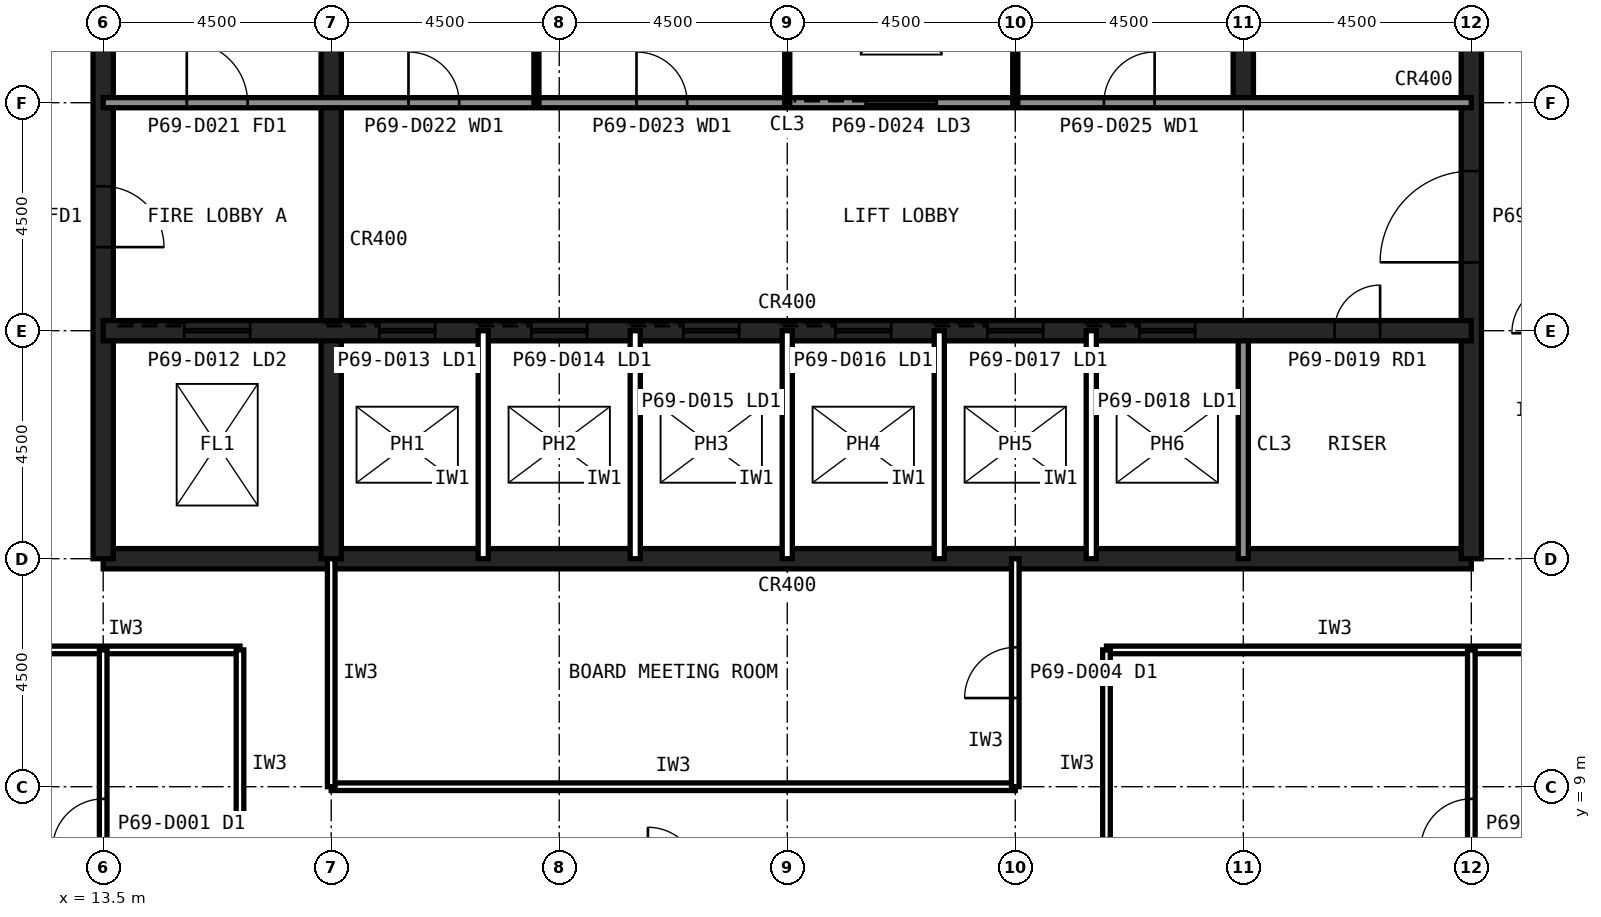
"""IFC4 building model, lengths in metres.
Left out: names, types, materials, properties, quantities, classifications, styles, units other than length and angle.
Written with IfcOpenShell. Run it as: python <this file> out.ifc"""

import sys

from ifc_helpers import new_model, si_unit, direction, frame, frame_2d, origin, place, context, subcontext, project, spatial, rectangle, extrude, element, fill, save


model = new_model("IFC4")
c1 = context("Model", 3, precision=1e-05, world=origin(), true_north=direction((0.0, 1.0)))
c2 = subcontext(c1, "Body", "Model", "MODEL_VIEW")
j1 = project(units=[si_unit("LENGTHUNIT", "METRE"), si_unit("PLANEANGLEUNIT", "RADIAN")], contexts=[c1])
p1 = place(None, origin())
s1 = spatial("IfcSite", under=j1, at=p1, CompositionType="ELEMENT")
p2 = place(p1, origin())
s2 = spatial("IfcBuilding", under=s1, at=p2, CompositionType="ELEMENT")
p3 = place(p2, frame((0.0, 0.0, 286.6)))
s3 = spatial("IfcBuildingStorey", under=s2, at=p3, CompositionType="ELEMENT", Elevation=286.6)
p4 = place(p3, frame((13.5, 13.5, 0.0), z_axis=(0.0, 0.0, 1.0), x_axis=(1.0, 0.0, 0.0)))
e1 = element("IfcWall", 1, at=p4, inside=s3, PredefinedType="SHEAR", context=c2, shape_type="SweptSolid", body=[
    extrude(rectangle(XDim=27.0, YDim=0.4, at=frame_2d((13.5, 0.0))), origin(), (0.0, 0.0, 1.0), 4.0),
])
p5 = place(p3, frame((40.5, 13.5, 0.0), z_axis=(0.0, 0.0, 1.0), x_axis=(0.0, 1.0, 0.0)))
e2 = element("IfcWall", 2, at=p5, inside=s3, PredefinedType="SHEAR", context=c2, shape_type="SweptSolid", body=[
    extrude(rectangle(XDim=27.0, YDim=0.4, at=frame_2d((13.5, 0.0))), origin(), (0.0, 0.0, 1.0), 4.0),
])
p6 = place(p5, frame((5.85, 0.0, 0.0)))
e3 = element("IfcOpeningElement", 3, at=p6, cuts=e2, PredefinedType="OPENING", context=c2, shape_type="SweptSolid", body=[
    extrude(rectangle(XDim=1.8, YDim=2.1, at=frame_2d((0.9, 1.05))), frame((0.0, 0.21, 0.0), z_axis=(0.0, -1.0, 0.0), x_axis=(1.0, 0.0, 0.0)), (0.0, 0.0, 1.0), 0.42),
])
p7 = place(p5, frame((19.65, 0.0, 0.0)))
e4 = element("IfcOpeningElement", 4, at=p7, cuts=e2, PredefinedType="OPENING", context=c2, shape_type="SweptSolid", body=[
    extrude(rectangle(XDim=1.2, YDim=2.1, at=frame_2d((0.6, 1.05))), frame((0.0, 0.21, 0.0), z_axis=(0.0, -1.0, 0.0), x_axis=(1.0, 0.0, 0.0)), (0.0, 0.0, 1.0), 0.42),
])
p8 = place(p3, frame((13.5, 40.5, 0.0), z_axis=(0.0, 0.0, 1.0), x_axis=(0.0, -1.0, 0.0)))
e5 = element("IfcWall", 5, at=p8, inside=s3, PredefinedType="SHEAR", context=c2, shape_type="SweptSolid", body=[
    extrude(rectangle(XDim=27.0, YDim=0.4, at=frame_2d((13.5, 0.0))), origin(), (0.0, 0.0, 1.0), 4.0),
])
p9 = place(p8, frame((19.65, 0.0, 0.0)))
e6 = element("IfcOpeningElement", 6, at=p9, cuts=e5, PredefinedType="OPENING", context=c2, shape_type="SweptSolid", body=[
    extrude(rectangle(XDim=1.2, YDim=2.1, at=frame_2d((0.6, 1.05))), frame((0.0, 0.21, 0.0), z_axis=(0.0, -1.0, 0.0), x_axis=(1.0, 0.0, 0.0)), (0.0, 0.0, 1.0), 0.42),
])
p10 = place(p8, frame((5.85, 0.0, 0.0)))
e7 = element("IfcOpeningElement", 7, at=p10, cuts=e5, PredefinedType="OPENING", context=c2, shape_type="SweptSolid", body=[
    extrude(rectangle(XDim=1.8, YDim=2.1, at=frame_2d((0.9, 1.05))), frame((0.0, 0.21, 0.0), z_axis=(0.0, -1.0, 0.0), x_axis=(1.0, 0.0, 0.0)), (0.0, 0.0, 1.0), 0.42),
])
p11 = place(p3, frame((18.0, 13.5, 0.0), z_axis=(0.0, 0.0, 1.0), x_axis=(0.0, 1.0, 0.0)))
e8 = element("IfcWall", 8, at=p11, inside=s3, PredefinedType="SHEAR", context=c2, shape_type="SweptSolid", body=[
    extrude(rectangle(XDim=18.0, YDim=0.4, at=frame_2d((9.0, 0.0))), origin(), (0.0, 0.0, 1.0), 4.0),
])
p12 = place(p3, frame((36.0, 13.5, 0.0), z_axis=(0.0, 0.0, 1.0), x_axis=(0.0, 1.0, 0.0)))
e9 = element("IfcWall", 9, at=p12, inside=s3, PredefinedType="SOLIDWALL", context=c2, shape_type="SweptSolid", body=[
    extrude(rectangle(XDim=4.5, YDim=0.2, at=frame_2d((2.25, 0.0))), origin(), (0.0, 0.0, 1.0), 3.84),
])
p13 = place(p3, frame((36.0, 22.5, 0.0), z_axis=(0.0, 0.0, 1.0), x_axis=(0.0, 1.0, 0.0)))
e10 = element("IfcWall", 10, at=p13, inside=s3, PredefinedType="SHEAR", context=c2, shape_type="SweptSolid", body=[
    extrude(rectangle(XDim=18.0, YDim=0.4, at=frame_2d((9.0, 0.0))), origin(), (0.0, 0.0, 1.0), 4.0),
])
p14 = place(p3, frame((13.5, 18.0, 0.0), z_axis=(0.0, 0.0, 1.0), x_axis=(1.0, 0.0, 0.0)))
e11 = element("IfcWall", 11, at=p14, inside=s3, PredefinedType="SHEAR", context=c2, shape_type="SweptSolid", body=[
    extrude(rectangle(XDim=27.0, YDim=0.4, at=frame_2d((13.5, 0.0))), origin(), (0.0, 0.0, 1.0), 4.0),
])
p15 = place(p14, frame((24.3, 0.0, 0.0)))
e12 = element("IfcOpeningElement", 12, at=p15, cuts=e11, PredefinedType="OPENING", context=c2, shape_type="SweptSolid", body=[
    extrude(rectangle(XDim=0.9, YDim=2.1, at=frame_2d((0.45, 1.05))), frame((0.0, 0.21, 0.0), z_axis=(0.0, -1.0, 0.0), x_axis=(1.0, 0.0, 0.0)), (0.0, 0.0, 1.0), 0.42),
])
p16 = place(p14, frame((5.45, 0.0, 0.0)))
e13 = element("IfcOpeningElement", 13, at=p16, cuts=e11, PredefinedType="OPENING", context=c2, shape_type="SweptSolid", body=[
    extrude(rectangle(XDim=1.1, YDim=2.1, at=frame_2d((0.55, 1.05))), frame((0.0, 0.21, 0.0), z_axis=(0.0, -1.0, 0.0), x_axis=(1.0, 0.0, 0.0)), (0.0, 0.0, 1.0), 0.42),
])
p17 = place(p14, frame((8.45, 0.0, 0.0)))
e14 = element("IfcOpeningElement", 14, at=p17, cuts=e11, PredefinedType="OPENING", context=c2, shape_type="SweptSolid", body=[
    extrude(rectangle(XDim=1.1, YDim=2.1, at=frame_2d((0.55, 1.05))), frame((0.0, 0.21, 0.0), z_axis=(0.0, -1.0, 0.0), x_axis=(1.0, 0.0, 0.0)), (0.0, 0.0, 1.0), 0.42),
])
p18 = place(p14, frame((11.45, 0.0, 0.0)))
e15 = element("IfcOpeningElement", 15, at=p18, cuts=e11, PredefinedType="OPENING", context=c2, shape_type="SweptSolid", body=[
    extrude(rectangle(XDim=1.1, YDim=2.1, at=frame_2d((0.55, 1.05))), frame((0.0, 0.21, 0.0), z_axis=(0.0, -1.0, 0.0), x_axis=(1.0, 0.0, 0.0)), (0.0, 0.0, 1.0), 0.42),
])
p19 = place(p14, frame((14.45, 0.0, 0.0)))
e16 = element("IfcOpeningElement", 16, at=p19, cuts=e11, PredefinedType="OPENING", context=c2, shape_type="SweptSolid", body=[
    extrude(rectangle(XDim=1.1, YDim=2.1, at=frame_2d((0.55, 1.05))), frame((0.0, 0.21, 0.0), z_axis=(0.0, -1.0, 0.0), x_axis=(1.0, 0.0, 0.0)), (0.0, 0.0, 1.0), 0.42),
])
p20 = place(p14, frame((17.45, 0.0, 0.0)))
e17 = element("IfcOpeningElement", 17, at=p20, cuts=e11, PredefinedType="OPENING", context=c2, shape_type="SweptSolid", body=[
    extrude(rectangle(XDim=1.1, YDim=2.1, at=frame_2d((0.55, 1.05))), frame((0.0, 0.21, 0.0), z_axis=(0.0, -1.0, 0.0), x_axis=(1.0, 0.0, 0.0)), (0.0, 0.0, 1.0), 0.42),
])
p21 = place(p14, frame((20.45, 0.0, 0.0)))
e18 = element("IfcOpeningElement", 18, at=p21, cuts=e11, PredefinedType="OPENING", context=c2, shape_type="SweptSolid", body=[
    extrude(rectangle(XDim=1.1, YDim=2.1, at=frame_2d((0.55, 1.05))), frame((0.0, 0.21, 0.0), z_axis=(0.0, -1.0, 0.0), x_axis=(1.0, 0.0, 0.0)), (0.0, 0.0, 1.0), 0.42),
])
p22 = place(p14, frame((1.6, 0.0, 0.0)))
e19 = element("IfcOpeningElement", 19, at=p22, cuts=e11, PredefinedType="OPENING", context=c2, shape_type="SweptSolid", body=[
    extrude(rectangle(XDim=1.3, YDim=2.2, at=frame_2d((0.65, 1.1))), frame((0.0, 0.21, 0.0), z_axis=(0.0, -1.0, 0.0), x_axis=(1.0, 0.0, 0.0)), (0.0, 0.0, 1.0), 0.42),
])
p23 = place(p3, frame((13.5, 22.5, 0.0), z_axis=(0.0, 0.0, 1.0), x_axis=(1.0, 0.0, 0.0)))
e20 = element("IfcWall", 20, at=p23, inside=s3, PredefinedType="SOLIDWALL", context=c2, shape_type="SweptSolid", body=[
    extrude(rectangle(XDim=27.0, YDim=0.2, at=frame_2d((13.5, 0.0))), origin(), (0.0, 0.0, 1.0), 3.84),
])
p24 = place(p23, frame((1.65, 0.0, 0.0)))
e21 = element("IfcOpeningElement", 21, at=p24, cuts=e20, PredefinedType="OPENING", context=c2, shape_type="SweptSolid", body=[
    extrude(rectangle(XDim=1.2, YDim=2.1, at=frame_2d((0.6, 1.05))), frame((0.0, 0.11, 0.0), z_axis=(0.0, -1.0, 0.0), x_axis=(1.0, 0.0, 0.0)), (0.0, 0.0, 1.0), 0.22),
])
p25 = place(p23, frame((6.025, 0.0, 0.0)))
e22 = element("IfcOpeningElement", 22, at=p25, cuts=e20, PredefinedType="OPENING", context=c2, shape_type="SweptSolid", body=[
    extrude(rectangle(XDim=1.0, YDim=2.1, at=frame_2d((0.5, 1.05))), frame((0.0, 0.11, 0.0), z_axis=(0.0, -1.0, 0.0), x_axis=(1.0, 0.0, 0.0)), (0.0, 0.0, 1.0), 0.22),
])
p26 = place(p23, frame((10.525, 0.0, 0.0)))
e23 = element("IfcOpeningElement", 23, at=p26, cuts=e20, PredefinedType="OPENING", context=c2, shape_type="SweptSolid", body=[
    extrude(rectangle(XDim=1.0, YDim=2.1, at=frame_2d((0.5, 1.05))), frame((0.0, 0.11, 0.0), z_axis=(0.0, -1.0, 0.0), x_axis=(1.0, 0.0, 0.0)), (0.0, 0.0, 1.0), 0.22),
])
p27 = place(p23, frame((19.75, 0.0, 0.0)))
e24 = element("IfcOpeningElement", 24, at=p27, cuts=e20, PredefinedType="OPENING", context=c2, shape_type="SweptSolid", body=[
    extrude(rectangle(XDim=1.0, YDim=2.1, at=frame_2d((0.5, 1.05))), frame((0.0, 0.11, 0.0), z_axis=(0.0, -1.0, 0.0), x_axis=(1.0, 0.0, 0.0)), (0.0, 0.0, 1.0), 0.22),
])
p28 = place(p23, frame((15.05, 0.0, 0.0)))
e25 = element("IfcOpeningElement", 25, at=p28, cuts=e20, PredefinedType="OPENING", context=c2, shape_type="SweptSolid", body=[
    extrude(rectangle(XDim=1.4, YDim=2.4, at=frame_2d((0.7, 1.2))), frame((0.0, 0.11, 0.0), z_axis=(0.0, -1.0, 0.0), x_axis=(1.0, 0.0, 0.0)), (0.0, 0.0, 1.0), 0.22),
])
for number, where, z_axis, x_axis in (
    (26, (21.0, 13.5, 0.0), (0.0, 0.0, 1.0), (0.0, 1.0, 0.0)),
    (27, (24.0, 13.5, 0.0), (0.0, 0.0, 1.0), (0.0, 1.0, 0.0)),
    (28, (27.0, 13.5, 0.0), (0.0, 0.0, 1.0), (0.0, 1.0, 0.0)),
    (29, (30.0, 13.5, 0.0), (0.0, 0.0, 1.0), (0.0, 1.0, 0.0)),
    (30, (33.0, 13.5, 0.0), (0.0, 0.0, 1.0), (0.0, 1.0, 0.0)),
):
    element("IfcWall", number, at=place(p3, frame(where, z_axis=z_axis, x_axis=x_axis)), inside=s3, PredefinedType="PARTITIONING", context=c2, shape_type="SweptSolid", body=[
        extrude(rectangle(XDim=4.5, YDim=0.2, at=frame_2d((2.25, 0.0))), origin(), (0.0, 0.0, 1.0), 3.84),
    ])
for number, where, z_axis, x_axis in (
    (31, (22.05, 22.5, 0.0), (0.0, 0.0, 1.0), (0.0, 1.0, 0.0)),
    (32, (27.0, 22.5, 0.0), (0.0, 0.0, 1.0), (0.0, 1.0, 0.0)),
    (33, (31.5, 22.5, 0.0), (0.0, 0.0, 1.0), (0.0, 1.0, 0.0)),
):
    element("IfcWall", number, at=place(p3, frame(where, z_axis=z_axis, x_axis=x_axis)), inside=s3, PredefinedType="PLUMBINGWALL", context=c2, shape_type="SweptSolid", body=[
        extrude(rectangle(XDim=9.0, YDim=0.1, at=frame_2d((4.5, 0.0))), origin(), (0.0, 0.0, 1.0), 3.84),
    ])
p29 = place(p3, frame((33.3, 11.7, 0.0), z_axis=(0.0, 0.0, 1.0), x_axis=(1.0, 0.0, 0.0)))
e34 = element("IfcWall", 34, at=p29, inside=s3, PredefinedType="PARTITIONING", context=c2, shape_type="SweptSolid", body=[
    extrude(rectangle(XDim=9.0, YDim=0.15, at=frame_2d((4.5, 0.0))), origin(), (0.0, 0.0, 1.0), 3.84),
])
for number, where, z_axis, x_axis in (
    (35, (11.7, 11.7, 0.0), (0.0, 0.0, 1.0), (1.0, 0.0, 0.0)),
    (36, (16.2, 11.7, 0.0), (0.0, 0.0, 1.0), (0.0, -1.0, 0.0)),
    (37, (33.3, 7.2, 0.0), (0.0, 0.0, 1.0), (0.0, 1.0, 0.0)),
):
    element("IfcWall", number, at=place(p3, frame(where, z_axis=z_axis, x_axis=x_axis)), inside=s3, PredefinedType="PARTITIONING", context=c2, shape_type="SweptSolid", body=[
        extrude(rectangle(XDim=4.5, YDim=0.15, at=frame_2d((2.25, 0.0))), origin(), (0.0, 0.0, 1.0), 3.84),
    ])
p30 = place(p3, frame((18.0, 9.0, 0.0), z_axis=(0.0, 0.0, 1.0), x_axis=(1.0, 0.0, 0.0)))
e38 = element("IfcWall", 38, at=p30, inside=s3, PredefinedType="PARTITIONING", context=c2, shape_type="SweptSolid", body=[
    extrude(rectangle(XDim=13.5, YDim=0.15, at=frame_2d((6.75, 0.0))), origin(), (0.0, 0.0, 1.0), 3.84),
])
p31 = place(p3, frame((31.5, 9.0, 0.0), z_axis=(0.0, 0.0, 1.0), x_axis=(0.0, 1.0, 0.0)))
e39 = element("IfcWall", 39, at=p31, inside=s3, PredefinedType="PARTITIONING", context=c2, shape_type="SweptSolid", body=[
    extrude(rectangle(XDim=4.5, YDim=0.15, at=frame_2d((2.25, 0.0))), origin(), (0.0, 0.0, 1.0), 2.989),
])
p32 = place(p31, frame((1.75, 0.0, 0.0)))
e40 = element("IfcOpeningElement", 40, at=p32, cuts=e39, PredefinedType="OPENING", context=c2, shape_type="SweptSolid", body=[
    extrude(rectangle(XDim=1.0, YDim=2.1, at=frame_2d((0.5, 1.05))), frame((0.0, 0.085, 0.0), z_axis=(0.0, -1.0, 0.0), x_axis=(1.0, 0.0, 0.0)), (0.0, 0.0, 1.0), 0.17),
])
p33 = place(p3, frame((18.0, 13.5, 0.0), z_axis=(0.0, 0.0, 1.0), x_axis=(0.0, -1.0, 0.0)))
e41 = element("IfcWall", 41, at=p33, inside=s3, PredefinedType="PARTITIONING", context=c2, shape_type="SweptSolid", body=[
    extrude(rectangle(XDim=4.5, YDim=0.15, at=frame_2d((2.25, 0.0))), origin(), (0.0, 0.0, 1.0), 2.989),
])
p34 = place(p3, frame((40.5, 4.82, 0.0), z_axis=(0.0, 0.0, 1.0), x_axis=(0.0, 1.0, 0.0)))
e42 = element("IfcWall", 42, at=p34, inside=s3, PredefinedType="PARTITIONING", context=c2, shape_type="SweptSolid", body=[
    extrude(rectangle(XDim=6.88, YDim=0.15, at=frame_2d((3.44, 0.0))), origin(), (0.0, 0.0, 1.0), 2.989),
])
p35 = place(p34, frame((2.94, 0.0, 0.0)))
e43 = element("IfcOpeningElement", 43, at=p35, cuts=e42, PredefinedType="OPENING", context=c2, shape_type="SweptSolid", body=[
    extrude(rectangle(XDim=1.0, YDim=2.1, at=frame_2d((0.5, 1.05))), frame((0.0, 0.085, 0.0), z_axis=(0.0, -1.0, 0.0), x_axis=(1.0, 0.0, 0.0)), (0.0, 0.0, 1.0), 0.17),
])
p36 = place(p3, frame((13.5, 4.82, 0.0), z_axis=(0.0, 0.0, 1.0), x_axis=(0.0, 1.0, 0.0)))
e44 = element("IfcWall", 44, at=p36, inside=s3, PredefinedType="PARTITIONING", context=c2, shape_type="SweptSolid", body=[
    extrude(rectangle(XDim=6.88, YDim=0.15, at=frame_2d((3.44, 0.0))), origin(), (0.0, 0.0, 1.0), 2.989),
])
p37 = place(p36, frame((2.94, 0.0, 0.0)))
e45 = element("IfcOpeningElement", 45, at=p37, cuts=e44, PredefinedType="OPENING", context=c2, shape_type="SweptSolid", body=[
    extrude(rectangle(XDim=1.0, YDim=2.1, at=frame_2d((0.5, 1.05))), frame((0.0, 0.085, 0.0), z_axis=(0.0, -1.0, 0.0), x_axis=(1.0, 0.0, 0.0)), (0.0, 0.0, 1.0), 0.17),
])
p38 = place(p9, origin())
e46 = element("IfcDoor", 46, at=p38, inside=s3, OperationType="SINGLE_SWING_RIGHT", PredefinedType="DOOR", context=c2, shape_type="SweptSolid", body=[
    extrude(rectangle(XDim=1.2, YDim=2.1, at=frame_2d((0.6, 1.05))), frame((0.0, 0.025, 0.0), z_axis=(0.0, -1.0, 0.0), x_axis=(1.0, 0.0, 0.0)), (0.0, 0.0, 1.0), 0.05),
])
fill(e6, e46)
p39 = place(p6, origin())
e47 = element("IfcDoor", 47, at=p39, inside=s3, OperationType="SINGLE_SWING_LEFT", PredefinedType="DOOR", context=c2, shape_type="SweptSolid", body=[
    extrude(rectangle(XDim=1.8, YDim=2.1, at=frame_2d((0.9, 1.05))), frame((0.0, 0.025, 0.0), z_axis=(0.0, -1.0, 0.0), x_axis=(1.0, 0.0, 0.0)), (0.0, 0.0, 1.0), 0.05),
])
fill(e3, e47)
p40 = place(p24, origin())
e48 = element("IfcDoor", 48, at=p40, inside=s3, OperationType="SINGLE_SWING_LEFT", PredefinedType="DOOR", context=c2, shape_type="SweptSolid", body=[
    extrude(rectangle(XDim=1.2, YDim=2.1, at=frame_2d((0.6, 1.05))), frame((0.0, 0.025, 0.0), z_axis=(0.0, -1.0, 0.0), x_axis=(1.0, 0.0, 0.0)), (0.0, 0.0, 1.0), 0.05),
])
fill(e21, e48)
p41 = place(p25, origin())
e49 = element("IfcDoor", 49, at=p41, inside=s3, OperationType="SINGLE_SWING_LEFT", PredefinedType="DOOR", context=c2, shape_type="SweptSolid", body=[
    extrude(rectangle(XDim=1.0, YDim=2.1, at=frame_2d((0.5, 1.05))), frame((0.0, 0.025, 0.0), z_axis=(0.0, -1.0, 0.0), x_axis=(1.0, 0.0, 0.0)), (0.0, 0.0, 1.0), 0.05),
])
fill(e22, e49)
p42 = place(p26, origin())
e50 = element("IfcDoor", 50, at=p42, inside=s3, OperationType="SINGLE_SWING_LEFT", PredefinedType="DOOR", context=c2, shape_type="SweptSolid", body=[
    extrude(rectangle(XDim=1.0, YDim=2.1, at=frame_2d((0.5, 1.05))), frame((0.0, 0.025, 0.0), z_axis=(0.0, -1.0, 0.0), x_axis=(1.0, 0.0, 0.0)), (0.0, 0.0, 1.0), 0.05),
])
fill(e23, e50)
p43 = place(p27, origin())
e51 = element("IfcDoor", 51, at=p43, inside=s3, OperationType="SINGLE_SWING_RIGHT", PredefinedType="DOOR", context=c2, shape_type="SweptSolid", body=[
    extrude(rectangle(XDim=1.0, YDim=2.1, at=frame_2d((0.5, 1.05))), frame((0.0, 0.025, 0.0), z_axis=(0.0, -1.0, 0.0), x_axis=(1.0, 0.0, 0.0)), (0.0, 0.0, 1.0), 0.05),
])
fill(e24, e51)
p44 = place(p15, origin())
e52 = element("IfcDoor", 52, at=p44, inside=s3, OperationType="SINGLE_SWING_RIGHT", PredefinedType="DOOR", context=c2, shape_type="SweptSolid", body=[
    extrude(rectangle(XDim=0.9, YDim=2.1, at=frame_2d((0.45, 1.05))), frame((0.0, 0.025, 0.0), z_axis=(0.0, -1.0, 0.0), x_axis=(1.0, 0.0, 0.0)), (0.0, 0.0, 1.0), 0.05),
])
fill(e12, e52)
p45 = place(p16, origin())
e53 = element("IfcDoor", 53, at=p45, inside=s3, OperationType="SLIDING_TO_LEFT", PredefinedType="DOOR", context=c2, shape_type="SweptSolid", body=[
    extrude(rectangle(XDim=1.1, YDim=2.1, at=frame_2d((0.55, 1.05))), frame((0.0, 0.025, 0.0), z_axis=(0.0, -1.0, 0.0), x_axis=(1.0, 0.0, 0.0)), (0.0, 0.0, 1.0), 0.05),
])
fill(e13, e53)
p46 = place(p17, origin())
e54 = element("IfcDoor", 54, at=p46, inside=s3, OperationType="SLIDING_TO_LEFT", PredefinedType="DOOR", context=c2, shape_type="SweptSolid", body=[
    extrude(rectangle(XDim=1.1, YDim=2.1, at=frame_2d((0.55, 1.05))), frame((0.0, 0.025, 0.0), z_axis=(0.0, -1.0, 0.0), x_axis=(1.0, 0.0, 0.0)), (0.0, 0.0, 1.0), 0.05),
])
fill(e14, e54)
p47 = place(p18, origin())
e55 = element("IfcDoor", 55, at=p47, inside=s3, OperationType="SLIDING_TO_LEFT", PredefinedType="DOOR", context=c2, shape_type="SweptSolid", body=[
    extrude(rectangle(XDim=1.1, YDim=2.1, at=frame_2d((0.55, 1.05))), frame((0.0, 0.025, 0.0), z_axis=(0.0, -1.0, 0.0), x_axis=(1.0, 0.0, 0.0)), (0.0, 0.0, 1.0), 0.05),
])
fill(e15, e55)
p48 = place(p19, origin())
e56 = element("IfcDoor", 56, at=p48, inside=s3, OperationType="SLIDING_TO_LEFT", PredefinedType="DOOR", context=c2, shape_type="SweptSolid", body=[
    extrude(rectangle(XDim=1.1, YDim=2.1, at=frame_2d((0.55, 1.05))), frame((0.0, 0.025, 0.0), z_axis=(0.0, -1.0, 0.0), x_axis=(1.0, 0.0, 0.0)), (0.0, 0.0, 1.0), 0.05),
])
fill(e16, e56)
p49 = place(p20, origin())
e57 = element("IfcDoor", 57, at=p49, inside=s3, OperationType="SLIDING_TO_LEFT", PredefinedType="DOOR", context=c2, shape_type="SweptSolid", body=[
    extrude(rectangle(XDim=1.1, YDim=2.1, at=frame_2d((0.55, 1.05))), frame((0.0, 0.025, 0.0), z_axis=(0.0, -1.0, 0.0), x_axis=(1.0, 0.0, 0.0)), (0.0, 0.0, 1.0), 0.05),
])
fill(e17, e57)
p50 = place(p21, origin())
e58 = element("IfcDoor", 58, at=p50, inside=s3, OperationType="SLIDING_TO_LEFT", PredefinedType="DOOR", context=c2, shape_type="SweptSolid", body=[
    extrude(rectangle(XDim=1.1, YDim=2.1, at=frame_2d((0.55, 1.05))), frame((0.0, 0.025, 0.0), z_axis=(0.0, -1.0, 0.0), x_axis=(1.0, 0.0, 0.0)), (0.0, 0.0, 1.0), 0.05),
])
fill(e18, e58)
p51 = place(p22, origin())
e59 = element("IfcDoor", 59, at=p51, inside=s3, OperationType="SLIDING_TO_LEFT", PredefinedType="DOOR", context=c2, shape_type="SweptSolid", body=[
    extrude(rectangle(XDim=1.3, YDim=2.2, at=frame_2d((0.65, 1.1))), frame((0.0, 0.025, 0.0), z_axis=(0.0, -1.0, 0.0), x_axis=(1.0, 0.0, 0.0)), (0.0, 0.0, 1.0), 0.05),
])
fill(e19, e59)
p52 = place(p28, origin())
e60 = element("IfcDoor", 60, at=p52, inside=s3, OperationType="SLIDING_TO_LEFT", PredefinedType="DOOR", context=c2, shape_type="SweptSolid", body=[
    extrude(rectangle(XDim=1.4, YDim=2.4, at=frame_2d((0.7, 1.2))), frame((0.0, 0.025, 0.0), z_axis=(0.0, -1.0, 0.0), x_axis=(1.0, 0.0, 0.0)), (0.0, 0.0, 1.0), 0.05),
])
fill(e25, e60)
p53 = place(p32, origin())
e61 = element("IfcDoor", 61, at=p53, inside=s3, OperationType="SINGLE_SWING_LEFT", PredefinedType="DOOR", context=c2, shape_type="SweptSolid", body=[
    extrude(rectangle(XDim=1.0, YDim=2.1, at=frame_2d((0.5, 1.05))), frame((0.0, 0.025, 0.0), z_axis=(0.0, -1.0, 0.0), x_axis=(1.0, 0.0, 0.0)), (0.0, 0.0, 1.0), 0.05),
])
fill(e40, e61)
p54 = place(p35, origin())
e62 = element("IfcDoor", 62, at=p54, inside=s3, OperationType="SINGLE_SWING_LEFT", PredefinedType="DOOR", context=c2, shape_type="SweptSolid", body=[
    extrude(rectangle(XDim=1.0, YDim=2.1, at=frame_2d((0.5, 1.05))), frame((0.0, 0.025, 0.0), z_axis=(0.0, -1.0, 0.0), x_axis=(1.0, 0.0, 0.0)), (0.0, 0.0, 1.0), 0.05),
])
fill(e43, e62)
p55 = place(p37, origin())
e63 = element("IfcDoor", 63, at=p55, inside=s3, OperationType="SINGLE_SWING_LEFT", PredefinedType="DOOR", context=c2, shape_type="SweptSolid", body=[
    extrude(rectangle(XDim=1.0, YDim=2.1, at=frame_2d((0.5, 1.05))), frame((0.0, 0.025, 0.0), z_axis=(0.0, -1.0, 0.0), x_axis=(1.0, 0.0, 0.0)), (0.0, 0.0, 1.0), 0.05),
])
fill(e45, e63)
save(model, sys.argv[1])
